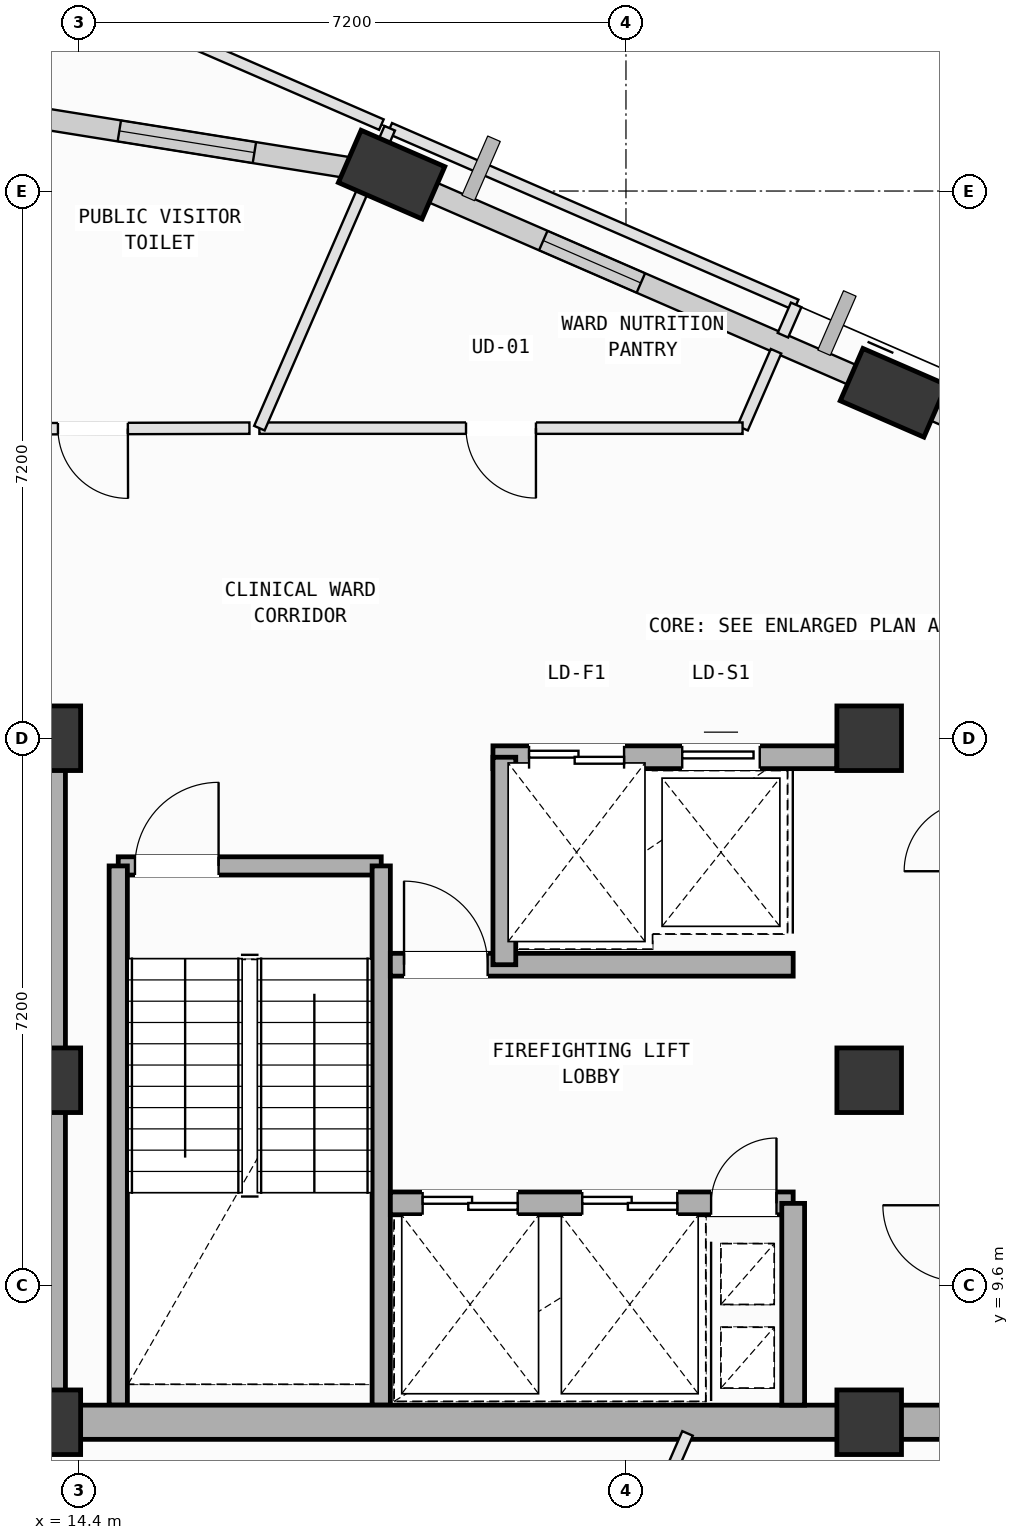
"""IFC4 building model, lengths in metres.
Left out: names, types, materials, properties, quantities, classifications, styles, units other than length and angle.
Written with IfcOpenShell. Run it as: python <this file> out.ifc"""

import sys

from ifc_helpers import new_model, si_unit, direction, frame, frame_2d, origin, origin_2d, place, context, subcontext, project, spatial, rectangle, extrude, element, fill, save


model = new_model("IFC4")
c1 = context("Model", 3, precision=1e-05, world=origin(), true_north=direction((0.0, 1.0)))
c2 = subcontext(c1, "Body", "Model", "MODEL_VIEW")
j1 = project(units=[si_unit("LENGTHUNIT", "METRE"), si_unit("PLANEANGLEUNIT", "RADIAN")], contexts=[c1])
p1 = place(None, origin())
s1 = spatial("IfcSite", under=j1, at=p1, CompositionType="ELEMENT")
p2 = place(p1, origin())
s2 = spatial("IfcBuilding", under=s1, at=p2, CompositionType="ELEMENT")
p3 = place(p2, frame((0.0, 0.0, 308.6)))
s3 = spatial("IfcBuildingStorey", under=s2, at=p3, CompositionType="ELEMENT", Elevation=308.6)
for number, where, z_axis, x_axis in (
    (1, (14.0, 7.8, 0.0), (0.0, 0.0, 1.0), (1.0, 0.0, 0.0)),
    (2, (14.0, 12.3, 0.0), (0.0, 0.0, 1.0), (1.0, 0.0, 0.0)),
    (3, (14.0, 16.8, 0.0), (0.0, 0.0, 1.0), (1.0, 0.0, 0.0)),
    (4, (24.8, 7.8, 0.0), (0.0, 0.0, 1.0), (1.0, 0.0, 0.0)),
    (5, (24.8, 12.3, 0.0), (0.0, 0.0, 1.0), (1.0, 0.0, 0.0)),
    (6, (24.8, 16.8, 0.0), (0.0, 0.0, 1.0), (1.0, 0.0, 0.0)),
):
    element("IfcColumn", number, at=place(p3, frame(where, z_axis=z_axis, x_axis=x_axis)), inside=s3, PredefinedType="COLUMN", context=c2, shape_type="SweptSolid", body=[
        extrude(rectangle(XDim=0.85, YDim=0.85, at=origin_2d()), origin(), (0.0, 0.0, 1.0), 4.0),
    ])
for number, where, z_axis, x_axis in (
    (7, (25.119, 21.345, 0.002), (0.0, 0.0, 1.0), (-0.917, 0.399, 0.0)),
    (8, (18.516, 24.216, 0.002), (0.0, 0.0, 1.0), (-0.917, 0.399, 0.0)),
):
    element("IfcColumn", number, at=place(p3, frame(where, z_axis=z_axis, x_axis=x_axis)), inside=s3, PredefinedType="COLUMN", context=c2, shape_type="SweptSolid", body=[
        extrude(rectangle(XDim=1.2, YDim=0.75, at=origin_2d()), origin(), (0.0, 0.0, 1.0), 3.996),
    ])
p4 = place(p3, frame((25.484, 21.187, 0.0), z_axis=(0.0, 0.0, 1.0), x_axis=(0.917060568388, -0.398747932794, 0.0)))
e9 = element("IfcWall", 9, at=p4, inside=s3, PredefinedType="SOLIDWALL", context=c2, shape_type="SweptSolid", body=[
    extrude(rectangle(XDim=6.955, YDim=0.28, at=frame_2d((3.478, 0.0))), origin(), (0.0, 0.0, 1.0), 2.765),
])
p5 = place(p3, frame((18.881, 24.058, 0.0), z_axis=(0.0, 0.0, 1.0), x_axis=(0.917070056253, -0.398726111414, 0.0)))
e10 = element("IfcWall", 10, at=p5, inside=s3, PredefinedType="SOLIDWALL", context=c2, shape_type="SweptSolid", body=[
    extrude(rectangle(XDim=6.405, YDim=0.28, at=frame_2d((3.202, 0.0))), origin(), (0.0, 0.0, 1.0), 3.265),
])
p6 = place(p5, frame((1.779, 0.0, 0.75)))
e11 = element("IfcOpeningElement", 11, at=p6, cuts=e10, PredefinedType="OPENING", context=c2, shape_type="SweptSolid", body=[
    extrude(rectangle(XDim=1.4, YDim=1.85, at=frame_2d((0.7, 0.925))), frame((0.0, 0.15, 0.0), z_axis=(0.0, -1.0, 0.0), x_axis=(1.0, 0.0, 0.0)), (0.0, 0.0, 1.0), 0.3),
])
p7 = place(p3, frame((12.946, 25.11, 0.0), z_axis=(0.0, 0.0, 1.0), x_axis=(0.987363821305, -0.158469821666, 0.0)))
e12 = element("IfcWall", 12, at=p7, inside=s3, PredefinedType="SOLIDWALL", context=c2, shape_type="SweptSolid", body=[
    extrude(rectangle(XDim=5.244, YDim=0.28, at=frame_2d((2.622, 0.0))), origin(), (0.0, 0.0, 1.0), 3.265),
])
p8 = place(p7, frame((2.014, 0.0, 0.75)))
e13 = element("IfcOpeningElement", 13, at=p8, cuts=e12, PredefinedType="OPENING", context=c2, shape_type="SweptSolid", body=[
    extrude(rectangle(XDim=1.8, YDim=2.05, at=frame_2d((0.9, 1.025))), frame((0.0, 0.15, 0.0), z_axis=(0.0, -1.0, 0.0), x_axis=(1.0, 0.0, 0.0)), (0.0, 0.0, 1.0), 0.3),
])
p9 = place(p3, frame((14.92, 15.12, 0.0), z_axis=(0.0, 0.0, 1.0), x_axis=(1.0, 0.0, 0.0)))
e14 = element("IfcWall", 14, at=p9, inside=s3, PredefinedType="SOLIDWALL", context=c2, shape_type="SweptSolid", body=[
    extrude(rectangle(XDim=3.46, YDim=0.24, at=frame_2d((1.73, 0.0))), origin(), (0.0, 0.0, 1.0), 3.78),
])
p10 = place(p9, frame((0.22, 0.0, 0.0)))
e15 = element("IfcOpeningElement", 15, at=p10, cuts=e14, PredefinedType="OPENING", context=c2, shape_type="SweptSolid", body=[
    extrude(rectangle(XDim=1.1, YDim=2.15, at=frame_2d((0.55, 1.075))), frame((0.0, 0.13, 0.0), z_axis=(0.0, -1.0, 0.0), x_axis=(1.0, 0.0, 0.0)), (0.0, 0.0, 1.0), 0.26),
])
for number, where, z_axis, x_axis in (
    (16, (18.38, 15.12, 0.0), (0.0, 0.0, 1.0), (0.0, -1.0, 0.0)),
    (17, (14.92, 8.025, 0.0), (0.0, 0.0, 1.0), (0.0, 1.0, 0.0)),
):
    element("IfcWall", number, at=place(p3, frame(where, z_axis=z_axis, x_axis=x_axis)), inside=s3, PredefinedType="SOLIDWALL", context=c2, shape_type="SweptSolid", body=[
        extrude(rectangle(XDim=7.095, YDim=0.24, at=frame_2d((3.548, 0.0))), origin(), (0.0, 0.0, 1.0), 3.78),
    ])
for number, where, z_axis, x_axis in (
    (18, (14.0, 7.8, 0.0), (0.0, 0.0, 1.0), (1.0, 0.0, 0.0)),
    (19, (24.8, 7.8, 0.0), (0.0, 0.0, 1.0), (1.0, 0.0, 0.0)),
):
    element("IfcWall", number, at=place(p3, frame(where, z_axis=z_axis, x_axis=x_axis)), inside=s3, PredefinedType="SHEAR", context=c2, shape_type="SweptSolid", body=[
        extrude(rectangle(XDim=10.8, YDim=0.45, at=frame_2d((5.4, 0.0))), origin(), (0.0, 0.0, 1.0), 3.78),
    ])
p11 = place(p3, frame((14.0, 16.8, 0.0), z_axis=(0.0, 0.0, 1.0), x_axis=(0.0, -1.0, 0.0)))
e20 = element("IfcWall", 20, at=p11, inside=s3, PredefinedType="SHEAR", context=c2, shape_type="SweptSolid", body=[
    extrude(rectangle(XDim=9.0, YDim=0.45, at=frame_2d((4.5, 0.0))), origin(), (0.0, 0.0, 1.0), 3.78),
])
p12 = place(p3, frame((19.85, 16.55, 0.0), z_axis=(0.0, 0.0, 1.0), x_axis=(1.0, 0.0, 0.0)))
e21 = element("IfcWall", 21, at=p12, inside=s3, PredefinedType="SOLIDWALL", context=c2, shape_type="SweptSolid", body=[
    extrude(rectangle(XDim=4.525, YDim=0.3, at=frame_2d((2.262, 0.0))), origin(), (0.0, 0.0, 1.0), 3.78),
])
p13 = place(p12, frame((0.475, 0.0, 0.0)))
e22 = element("IfcOpeningElement", 22, at=p13, cuts=e21, PredefinedType="OPENING", context=c2, shape_type="SweptSolid", body=[
    extrude(rectangle(XDim=1.25, YDim=2.18, at=frame_2d((0.625, 1.09))), frame((0.0, 0.16, 0.0), z_axis=(0.0, -1.0, 0.0), x_axis=(1.0, 0.0, 0.0)), (0.0, 0.0, 1.0), 0.32),
])
p14 = place(p12, frame((2.49, 0.0, 0.0)))
e23 = element("IfcOpeningElement", 23, at=p14, cuts=e21, PredefinedType="OPENING", context=c2, shape_type="SweptSolid", body=[
    extrude(rectangle(XDim=1.02, YDim=2.12, at=frame_2d((0.51, 1.06))), frame((0.0, 0.16, 0.0), z_axis=(0.0, -1.0, 0.0), x_axis=(1.0, 0.0, 0.0)), (0.0, 0.0, 1.0), 0.32),
])
p15 = place(p3, frame((18.5, 10.68, 0.0), z_axis=(0.0, 0.0, 1.0), x_axis=(1.0, 0.0, 0.0)))
e24 = element("IfcWall", 24, at=p15, inside=s3, PredefinedType="SOLIDWALL", context=c2, shape_type="SweptSolid", body=[
    extrude(rectangle(XDim=5.3, YDim=0.3, at=frame_2d((2.65, 0.0))), origin(), (0.0, 0.0, 1.0), 3.78),
])
p16 = place(p15, frame((4.22, 0.0, 0.0)))
e25 = element("IfcOpeningElement", 25, at=p16, cuts=e24, PredefinedType="OPENING", context=c2, shape_type="SweptSolid", body=[
    extrude(rectangle(XDim=0.86, YDim=2.06, at=frame_2d((0.43, 1.03))), frame((0.0, 0.16, 0.0), z_axis=(0.0, -1.0, 0.0), x_axis=(1.0, 0.0, 0.0)), (0.0, 0.0, 1.0), 0.32),
])
p17 = place(p15, frame((0.425, 0.0, 0.0)))
e26 = element("IfcOpeningElement", 26, at=p17, cuts=e24, PredefinedType="OPENING", context=c2, shape_type="SweptSolid", body=[
    extrude(rectangle(XDim=1.25, YDim=2.18, at=frame_2d((0.625, 1.09))), frame((0.0, 0.16, 0.0), z_axis=(0.0, -1.0, 0.0), x_axis=(1.0, 0.0, 0.0)), (0.0, 0.0, 1.0), 0.32),
])
p18 = place(p15, frame((2.525, 0.0, 0.0)))
e27 = element("IfcOpeningElement", 27, at=p18, cuts=e24, PredefinedType="OPENING", context=c2, shape_type="SweptSolid", body=[
    extrude(rectangle(XDim=1.25, YDim=2.18, at=frame_2d((0.625, 1.09))), frame((0.0, 0.16, 0.0), z_axis=(0.0, -1.0, 0.0), x_axis=(1.0, 0.0, 0.0)), (0.0, 0.0, 1.0), 0.32),
])
p19 = place(p3, frame((18.5, 13.82, 0.0), z_axis=(0.0, 0.0, 1.0), x_axis=(1.0, 0.0, 0.0)))
e28 = element("IfcWall", 28, at=p19, inside=s3, PredefinedType="SOLIDWALL", context=c2, shape_type="SweptSolid", body=[
    extrude(rectangle(XDim=5.3, YDim=0.3, at=frame_2d((2.65, 0.0))), origin(), (0.0, 0.0, 1.0), 3.78),
])
p20 = place(p19, frame((0.18, 0.0, 0.0)))
e29 = element("IfcOpeningElement", 29, at=p20, cuts=e28, PredefinedType="OPENING", context=c2, shape_type="SweptSolid", body=[
    extrude(rectangle(XDim=1.1, YDim=2.15, at=frame_2d((0.55, 1.075))), frame((0.0, 0.16, 0.0), z_axis=(0.0, -1.0, 0.0), x_axis=(1.0, 0.0, 0.0)), (0.0, 0.0, 1.0), 0.32),
])
p21 = place(p3, frame((23.8, 8.025, 0.0), z_axis=(0.0, 0.0, 1.0), x_axis=(0.0, 1.0, 0.0)))
e30 = element("IfcWall", 30, at=p21, inside=s3, PredefinedType="SOLIDWALL", context=c2, shape_type="SweptSolid", body=[
    extrude(rectangle(XDim=2.655, YDim=0.3, at=frame_2d((1.328, 0.0))), origin(), (0.0, 0.0, 1.0), 3.78),
])
p22 = place(p3, frame((20.0, 13.82, 0.0), z_axis=(0.0, 0.0, 1.0), x_axis=(0.0, 1.0, 0.0)))
e31 = element("IfcWall", 31, at=p22, inside=s3, PredefinedType="SOLIDWALL", context=c2, shape_type="SweptSolid", body=[
    extrude(rectangle(XDim=2.73, YDim=0.3, at=frame_2d((1.365, 0.0))), origin(), (0.0, 0.0, 1.0), 3.78),
])
p23 = place(p3, frame((20.345, 2.905, 0.0), z_axis=(0.0, 0.0, 1.0), x_axis=(0.398819215719, 0.917029570501, 0.0)))
e32 = element("IfcWall", 32, at=p23, inside=s3, PredefinedType="PARTITIONING", context=c2, shape_type="SweptSolid", body=[
    extrude(rectangle(XDim=5.178, YDim=0.15, at=frame_2d((2.589, 0.0))), origin(), (0.0, 0.0, 1.0), 3.78),
])
p24 = place(p23, frame((2.075, 0.0, 0.0)))
e33 = element("IfcOpeningElement", 33, at=p24, cuts=e32, PredefinedType="OPENING", context=c2, shape_type="SweptSolid", body=[
    extrude(rectangle(XDim=0.86, YDim=2.06, at=frame_2d((0.43, 1.03))), frame((0.0, 0.085, 0.0), z_axis=(0.0, -1.0, 0.0), x_axis=(1.0, 0.0, 0.0)), (0.0, 0.0, 1.0), 0.17),
])
p25 = place(p3, frame((18.492, 24.826, 0.0), z_axis=(0.0, 0.0, 1.0), x_axis=(0.917125302545, -0.398599020862, 0.0)))
e34 = element("IfcWall", 34, at=p25, inside=s3, PredefinedType="PARTITIONING", context=c2, shape_type="SweptSolid", body=[
    extrude(rectangle(XDim=5.83, YDim=0.15, at=frame_2d((2.915, 0.0))), origin(), (0.0, 0.0, 1.0), 3.78),
])
p26 = place(p3, frame((23.839, 22.502, 0.0), z_axis=(0.0, 0.0, 1.0), x_axis=(-0.399935888769, -0.916543116757, 0.0)))
e35 = element("IfcWall", 35, at=p26, inside=s3, PredefinedType="PARTITIONING", context=c2, shape_type="SweptSolid", body=[
    extrude(rectangle(XDim=0.435, YDim=0.15, at=frame_2d((0.218, 0.0))), origin(), (0.0, 0.0, 1.0), 3.78),
])
p27 = place(p3, frame((23.574, 21.892, 0.0), z_axis=(0.0, 0.0, 1.0), x_axis=(-0.398612867881, -0.917119284259, 0.0)))
e36 = element("IfcWall", 36, at=p27, inside=s3, PredefinedType="PARTITIONING", context=c2, shape_type="SweptSolid", body=[
    extrude(rectangle(XDim=1.104, YDim=0.15, at=frame_2d((0.552, 0.0))), origin(), (0.0, 0.0, 1.0), 3.78),
])
p28 = place(p3, frame((23.134, 20.88, 0.0), z_axis=(0.0, 0.0, 1.0), x_axis=(-1.0, 0.0, 0.0)))
e37 = element("IfcWall", 37, at=p28, inside=s3, PredefinedType="PARTITIONING", context=c2, shape_type="SweptSolid", body=[
    extrude(rectangle(XDim=6.357, YDim=0.15, at=frame_2d((3.178, 0.0))), origin(), (0.0, 0.0, 1.0), 3.78),
])
p29 = place(p28, frame((2.719, 0.0, 0.0)))
e38 = element("IfcOpeningElement", 38, at=p29, cuts=e37, PredefinedType="OPENING", context=c2, shape_type="SweptSolid", body=[
    extrude(rectangle(XDim=0.92, YDim=2.1, at=frame_2d((0.46, 1.05))), frame((0.0, 0.085, 0.0), z_axis=(0.0, -1.0, 0.0), x_axis=(1.0, 0.0, 0.0)), (0.0, 0.0, 1.0), 0.17),
])
p30 = place(p3, frame((16.777, 20.88, 0.0), z_axis=(0.0, 0.0, 1.0), x_axis=(0.398564265288, 0.917140407154, 0.0)))
e39 = element("IfcWall", 39, at=p30, inside=s3, PredefinedType="PARTITIONING", context=c2, shape_type="SweptSolid", body=[
    extrude(rectangle(XDim=4.302, YDim=0.15, at=frame_2d((2.151, 0.0))), origin(), (0.0, 0.0, 1.0), 2.765),
])
p31 = place(p3, frame((13.664, 25.345, 0.0), z_axis=(0.0, 0.0, 1.0), x_axis=(0.398732271116, 0.917067378097, 0.0)))
e40 = element("IfcWall", 40, at=p31, inside=s3, PredefinedType="PARTITIONING", context=c2, shape_type="SweptSolid", body=[
    extrude(rectangle(XDim=1.449, YDim=0.15, at=frame_2d((0.725, 0.0))), origin(), (0.0, 0.0, 1.0), 3.78),
])
p32 = place(p3, frame((14.288, 26.654, 0.0), z_axis=(0.0, 0.0, 1.0), x_axis=(0.91706744789, -0.398732110595, 0.0)))
e41 = element("IfcWall", 41, at=p32, inside=s3, PredefinedType="PARTITIONING", context=c2, shape_type="SweptSolid", body=[
    extrude(rectangle(XDim=4.464, YDim=0.15, at=frame_2d((2.232, 0.0))), origin(), (0.0, 0.0, 1.0), 3.78),
])
p33 = place(p3, frame((16.646, 20.88, 0.0), z_axis=(0.0, 0.0, 1.0), x_axis=(-0.999996442777, -0.002667289427, 0.0)))
e42 = element("IfcWall", 42, at=p33, inside=s3, PredefinedType="PARTITIONING", context=c2, shape_type="SweptSolid", body=[
    extrude(rectangle(XDim=4.119, YDim=0.15, at=frame_2d((2.06, 0.0))), origin(), (0.0, 0.0, 1.0), 3.415),
])
p34 = place(p33, frame((1.6, 0.0, 0.0)))
e43 = element("IfcOpeningElement", 43, at=p34, cuts=e42, PredefinedType="OPENING", context=c2, shape_type="SweptSolid", body=[
    extrude(rectangle(XDim=0.92, YDim=2.1, at=frame_2d((0.46, 1.05))), frame((0.0, 0.085, 0.0), z_axis=(0.0, -1.0, 0.0), x_axis=(1.0, 0.0, 0.0)), (0.0, 0.0, 1.0), 0.17),
])
p35 = place(p6, origin())
e44 = element("IfcWindow", 44, at=p35, inside=s3, PartitioningType="SINGLE_PANEL", PredefinedType="WINDOW", context=c2, shape_type="SweptSolid", body=[
    extrude(rectangle(XDim=1.4, YDim=1.85, at=frame_2d((0.7, 0.925))), frame((0.0, 0.03, 0.0), z_axis=(0.0, -1.0, 0.0), x_axis=(1.0, 0.0, 0.0)), (0.0, 0.0, 1.0), 0.06),
])
fill(e11, e44)
p36 = place(p8, origin())
e45 = element("IfcWindow", 45, at=p36, inside=s3, PartitioningType="SINGLE_PANEL", PredefinedType="WINDOW", context=c2, shape_type="SweptSolid", body=[
    extrude(rectangle(XDim=1.8, YDim=2.05, at=frame_2d((0.9, 1.025))), frame((0.0, 0.03, 0.0), z_axis=(0.0, -1.0, 0.0), x_axis=(1.0, 0.0, 0.0)), (0.0, 0.0, 1.0), 0.06),
])
fill(e13, e45)
p37 = place(p10, origin())
e46 = element("IfcDoor", 46, at=p37, inside=s3, OperationType="SINGLE_SWING_RIGHT", PredefinedType="DOOR", context=c2, shape_type="SweptSolid", body=[
    extrude(rectangle(XDim=1.1, YDim=2.15, at=frame_2d((0.55, 1.075))), frame((0.0, 0.025, 0.0), z_axis=(0.0, -1.0, 0.0), x_axis=(1.0, 0.0, 0.0)), (0.0, 0.0, 1.0), 0.05),
])
fill(e15, e46)
p38 = place(p16, origin())
e47 = element("IfcDoor", 47, at=p38, inside=s3, OperationType="SINGLE_SWING_RIGHT", PredefinedType="DOOR", context=c2, shape_type="SweptSolid", body=[
    extrude(rectangle(XDim=0.86, YDim=2.06, at=frame_2d((0.43, 1.03))), frame((0.0, 0.025, 0.0), z_axis=(0.0, -1.0, 0.0), x_axis=(1.0, 0.0, 0.0)), (0.0, 0.0, 1.0), 0.05),
])
fill(e25, e47)
p39 = place(p20, origin())
e48 = element("IfcDoor", 48, at=p39, inside=s3, OperationType="SINGLE_SWING_LEFT", PredefinedType="DOOR", context=c2, shape_type="SweptSolid", body=[
    extrude(rectangle(XDim=1.1, YDim=2.15, at=frame_2d((0.55, 1.075))), frame((0.0, 0.025, 0.0), z_axis=(0.0, -1.0, 0.0), x_axis=(1.0, 0.0, 0.0)), (0.0, 0.0, 1.0), 0.05),
])
fill(e29, e48)
p40 = place(p17, origin())
e49 = element("IfcDoor", 49, at=p40, inside=s3, OperationType="DOUBLE_DOOR_SLIDING", PredefinedType="DOOR", context=c2, shape_type="SweptSolid", body=[
    extrude(rectangle(XDim=1.25, YDim=2.18, at=frame_2d((0.625, 1.09))), frame((0.0, 0.025, 0.0), z_axis=(0.0, -1.0, 0.0), x_axis=(1.0, 0.0, 0.0)), (0.0, 0.0, 1.0), 0.05),
])
fill(e26, e49)
p41 = place(p18, origin())
e50 = element("IfcDoor", 50, at=p41, inside=s3, OperationType="DOUBLE_DOOR_SLIDING", PredefinedType="DOOR", context=c2, shape_type="SweptSolid", body=[
    extrude(rectangle(XDim=1.25, YDim=2.18, at=frame_2d((0.625, 1.09))), frame((0.0, 0.025, 0.0), z_axis=(0.0, -1.0, 0.0), x_axis=(1.0, 0.0, 0.0)), (0.0, 0.0, 1.0), 0.05),
])
fill(e27, e50)
p42 = place(p13, origin())
e51 = element("IfcDoor", 51, at=p42, inside=s3, OperationType="DOUBLE_DOOR_SLIDING", PredefinedType="DOOR", context=c2, shape_type="SweptSolid", body=[
    extrude(rectangle(XDim=1.25, YDim=2.18, at=frame_2d((0.625, 1.09))), frame((0.0, 0.025, 0.0), z_axis=(0.0, -1.0, 0.0), x_axis=(1.0, 0.0, 0.0)), (0.0, 0.0, 1.0), 0.05),
])
fill(e22, e51)
p43 = place(p14, origin())
e52 = element("IfcDoor", 52, at=p43, inside=s3, OperationType="SLIDING_TO_LEFT", PredefinedType="DOOR", context=c2, shape_type="SweptSolid", body=[
    extrude(rectangle(XDim=1.02, YDim=2.12, at=frame_2d((0.51, 1.06))), frame((0.0, 0.025, 0.0), z_axis=(0.0, -1.0, 0.0), x_axis=(1.0, 0.0, 0.0)), (0.0, 0.0, 1.0), 0.05),
])
fill(e23, e52)
p44 = place(p29, origin())
e53 = element("IfcDoor", 53, at=p44, inside=s3, OperationType="SINGLE_SWING_LEFT", PredefinedType="DOOR", context=c2, shape_type="SweptSolid", body=[
    extrude(rectangle(XDim=0.92, YDim=2.1, at=frame_2d((0.46, 1.05))), frame((0.0, 0.025, 0.0), z_axis=(0.0, -1.0, 0.0), x_axis=(1.0, 0.0, 0.0)), (0.0, 0.0, 1.0), 0.05),
])
fill(e38, e53)
p45 = place(p34, origin())
e54 = element("IfcDoor", 54, at=p45, inside=s3, OperationType="SINGLE_SWING_LEFT", PredefinedType="DOOR", context=c2, shape_type="SweptSolid", body=[
    extrude(rectangle(XDim=0.92, YDim=2.1, at=frame_2d((0.46, 1.05))), frame((0.0, 0.025, 0.0), z_axis=(0.0, -1.0, 0.0), x_axis=(1.0, 0.0, 0.0)), (0.0, 0.0, 1.0), 0.05),
])
fill(e43, e54)
save(model, sys.argv[1])
